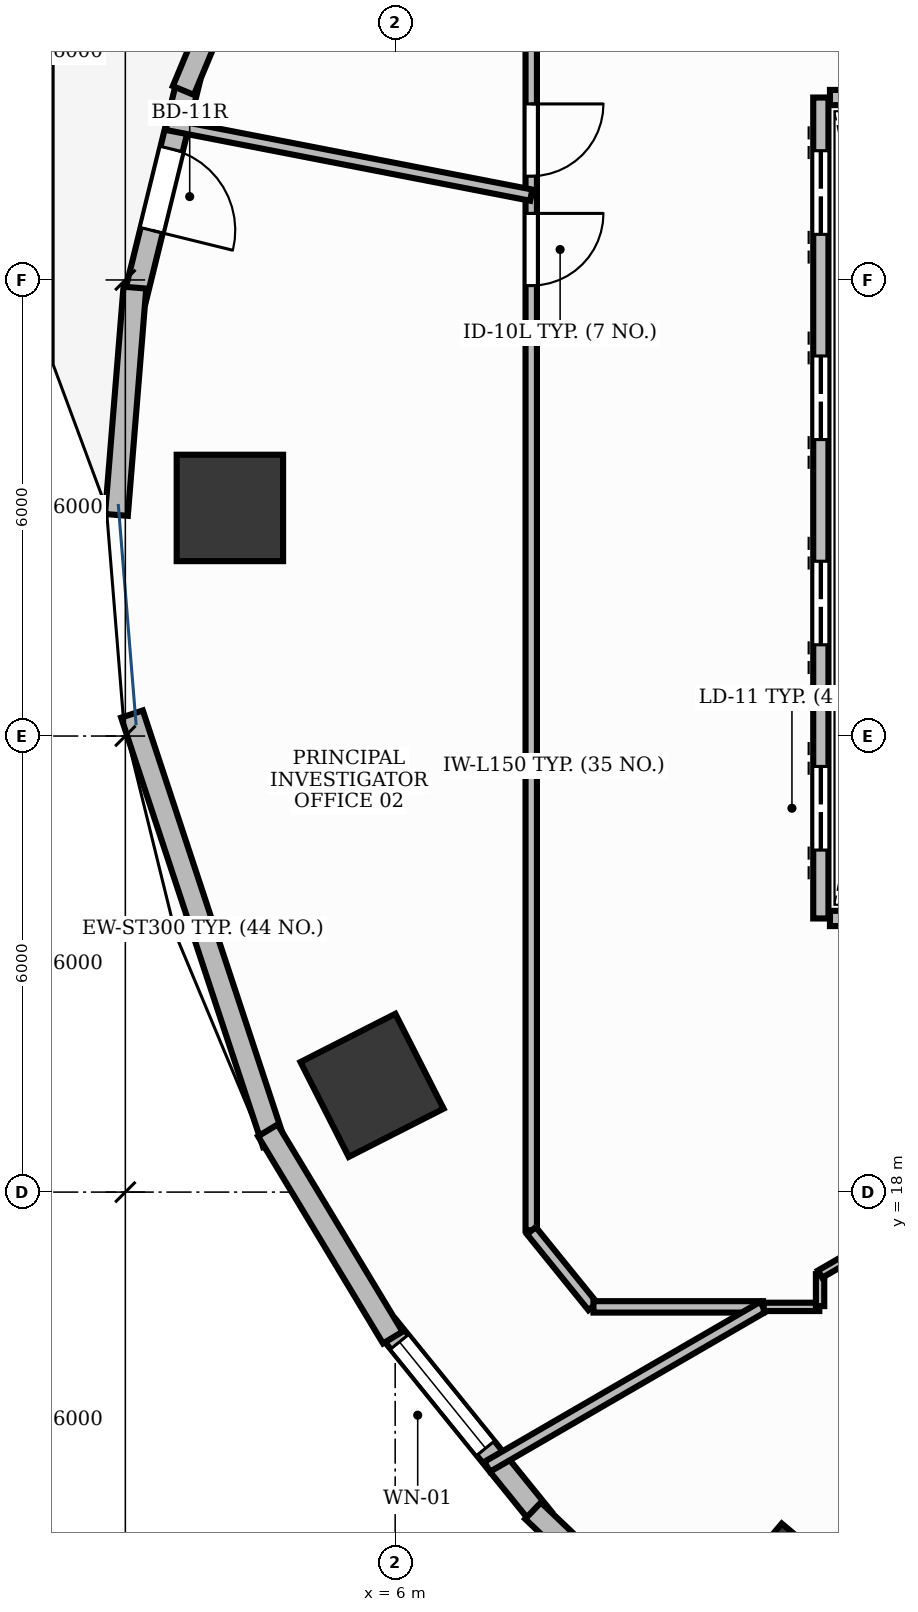
"""IFC4 building model, lengths in metres.
Left out: names, types, materials, properties, quantities, classifications, styles, units other than length and angle.
Written with IfcOpenShell. Run it as: python <this file> out.ifc"""

import sys

from ifc_helpers import new_model, si_unit, direction, frame, frame_2d, origin, origin_2d, place, context, subcontext, project, spatial, rectangle, extrude, element, fill, save


model = new_model("IFC4")
c1 = context("Model", 3, precision=1e-05, world=origin(), true_north=direction((0.0, 1.0)))
c2 = subcontext(c1, "Body", "Model", "MODEL_VIEW")
j1 = project(units=[si_unit("LENGTHUNIT", "METRE"), si_unit("PLANEANGLEUNIT", "RADIAN")], contexts=[c1])
p1 = place(None, origin())
s1 = spatial("IfcSite", under=j1, at=p1, CompositionType="ELEMENT")
p2 = place(p1, origin())
s2 = spatial("IfcBuilding", under=s1, at=p2, CompositionType="ELEMENT")
p3 = place(p2, frame((0.0, 0.0, 76.2)))
s3 = spatial("IfcBuildingStorey", under=s2, at=p3, CompositionType="ELEMENT", Elevation=76.2)
for number, where, z_axis, x_axis in (
    (1, (3.825, 27.001, -0.0), (0.0, 0.0, 1.0), (0.0, 1.0, 0.0)),
    (2, (5.696, 19.404, -0.0), (0.0, 0.0, 1.0), (-0.453, 0.891, 0.0)),
    (3, (11.17, 12.653, -0.0), (0.0, 0.0, 1.0), (-0.764, 0.645, 0.0)),
):
    element("IfcColumn", number, at=place(p3, frame(where, z_axis=z_axis, x_axis=x_axis)), inside=s3, PredefinedType="COLUMN", context=c2, shape_type="SweptSolid", body=[
        extrude(rectangle(XDim=1.4, YDim=1.4, at=origin_2d()), origin(), (0.0, 0.0, 1.0), 3.901),
    ])
p4 = place(p3, frame((3.285, 32.641, 0.0), z_axis=(0.0, 0.0, 1.0), x_axis=(-0.238522035896, -0.971137085273, 0.0)))
e4 = element("IfcWall", 4, at=p4, inside=s3, PredefinedType="STANDARD", context=c2, shape_type="SweptSolid", body=[
    extrude(rectangle(XDim=2.993, YDim=0.3, at=frame_2d((1.497, 0.0))), origin(), (0.0, 0.0, 1.0), 3.9),
])
p5 = place(p4, frame((0.946, 0.0, 0.0)))
e5 = element("IfcOpeningElement", 5, at=p5, cuts=e4, PredefinedType="OPENING", context=c2, shape_type="SweptSolid", body=[
    extrude(rectangle(XDim=1.1, YDim=2.15, at=frame_2d((0.55, 1.075))), frame((0.0, 0.165, 0.0), z_axis=(0.0, -1.0, 0.0), x_axis=(1.0, 0.0, 0.0)), (0.0, 0.0, 1.0), 0.33),
])
p6 = place(p3, frame((5.894, 16.23, 0.0), z_axis=(0.0, 0.0, 1.0), x_axis=(0.629295540187, -0.777166084631, 0.0)))
e6 = element("IfcWall", 6, at=p6, inside=s3, PredefinedType="STANDARD", context=c2, shape_type="SweptSolid", body=[
    extrude(rectangle(XDim=3.248, YDim=0.3, at=frame_2d((1.624, 0.0))), origin(), (0.0, 0.0, 1.0), 3.47),
])
p7 = place(p6, frame((0.258, 0.0, 0.9)))
e7 = element("IfcOpeningElement", 7, at=p7, cuts=e6, PredefinedType="OPENING", context=c2, shape_type="SweptSolid", body=[
    extrude(rectangle(XDim=1.8, YDim=2.1, at=frame_2d((0.9, 1.05))), frame((0.0, 0.165, 0.0), z_axis=(0.0, -1.0, 0.0), x_axis=(1.0, 0.0, 0.0)), (0.0, 0.0, 1.0), 0.33),
])
p8 = place(p3, frame((4.406, 35.349, 0.0), z_axis=(0.0, 0.0, 1.0), x_axis=(-0.38535448421, -0.922768617531, 0.0)))
e8 = element("IfcWall", 8, at=p8, inside=s3, PredefinedType="STANDARD", context=c2, shape_type="SweptSolid", body=[
    extrude(rectangle(XDim=3.095, YDim=0.3, at=frame_2d((1.548, 0.0))), origin(), (0.0, 0.0, 1.0), 3.9),
])
p9 = place(p3, frame((2.576, 29.899, 0.0), z_axis=(0.0, 0.0, 1.0), x_axis=(-0.080890160317, -0.996723021689, 0.0)))
e9 = element("IfcWall", 9, at=p9, inside=s3, PredefinedType="STANDARD", context=c2, shape_type="SweptSolid", body=[
    extrude(rectangle(XDim=3.0, YDim=0.3, at=frame_2d((1.5, 0.0))), origin(), (0.0, 0.0, 1.0), 3.9),
])
p10 = place(p3, frame((2.537, 24.289, 0.0), z_axis=(0.0, 0.0, 1.0), x_axis=(0.31372816724, -0.949512841978, 0.0)))
e10 = element("IfcWall", 10, at=p10, inside=s3, PredefinedType="STANDARD", context=c2, shape_type="SweptSolid", body=[
    extrude(rectangle(XDim=5.951, YDim=0.3, at=frame_2d((2.976, 0.0))), origin(), (0.0, 0.0, 1.0), 3.9),
])
p11 = place(p3, frame((4.325, 18.812, 0.0), z_axis=(0.0, 0.0, 1.0), x_axis=(0.516423528484, -0.856333310825, 0.0)))
e11 = element("IfcWall", 11, at=p11, inside=s3, PredefinedType="STANDARD", context=c2, shape_type="SweptSolid", body=[
    extrude(rectangle(XDim=3.183, YDim=0.3, at=frame_2d((1.591, 0.0))), origin(), (0.0, 0.0, 1.0), 3.47),
])
p12 = place(p3, frame((7.814, 13.808, 0.0), z_axis=(0.0, 0.0, 1.0), x_axis=(0.72369587847, -0.69011902994, 0.0)))
e12 = element("IfcWall", 12, at=p12, inside=s3, PredefinedType="STANDARD", context=c2, shape_type="SweptSolid", body=[
    extrude(rectangle(XDim=3.403, YDim=0.3, at=frame_2d((1.701, 0.0))), origin(), (0.0, 0.0, 1.0), 3.47),
])
p13 = place(p3, frame((11.6, 21.6, 0.0), z_axis=(0.0, 0.0, 1.0), x_axis=(0.0, 1.0, 0.0)))
e13 = element("IfcWall", 13, at=p13, inside=s3, PredefinedType="PARTITIONING", context=c2, shape_type="SweptSolid", body=[
    extrude(rectangle(XDim=10.8, YDim=0.2, at=frame_2d((5.4, 0.0))), origin(), (0.0, 0.0, 1.0), 2.91),
])
p14 = place(p13, frame((0.9, 0.0, 0.0)))
e14 = element("IfcOpeningElement", 14, at=p14, cuts=e13, PredefinedType="OPENING", context=c2, shape_type="SweptSolid", body=[
    extrude(rectangle(XDim=1.1, YDim=2.2, at=frame_2d((0.55, 1.1))), frame((0.0, 0.115, 0.0), z_axis=(0.0, -1.0, 0.0), x_axis=(1.0, 0.0, 0.0)), (0.0, 0.0, 1.0), 0.23),
])
p15 = place(p13, frame((3.6, 0.0, 0.0)))
e15 = element("IfcOpeningElement", 15, at=p15, cuts=e13, PredefinedType="OPENING", context=c2, shape_type="SweptSolid", body=[
    extrude(rectangle(XDim=1.1, YDim=2.2, at=frame_2d((0.55, 1.1))), frame((0.0, 0.115, 0.0), z_axis=(0.0, -1.0, 0.0), x_axis=(1.0, 0.0, 0.0)), (0.0, 0.0, 1.0), 0.23),
])
p16 = place(p13, frame((6.3, 0.0, 0.0)))
e16 = element("IfcOpeningElement", 16, at=p16, cuts=e13, PredefinedType="OPENING", context=c2, shape_type="SweptSolid", body=[
    extrude(rectangle(XDim=1.1, YDim=2.2, at=frame_2d((0.55, 1.1))), frame((0.0, 0.115, 0.0), z_axis=(0.0, -1.0, 0.0), x_axis=(1.0, 0.0, 0.0)), (0.0, 0.0, 1.0), 0.23),
])
p17 = place(p13, frame((9.0, 0.0, 0.0)))
e17 = element("IfcOpeningElement", 17, at=p17, cuts=e13, PredefinedType="OPENING", context=c2, shape_type="SweptSolid", body=[
    extrude(rectangle(XDim=1.1, YDim=2.2, at=frame_2d((0.55, 1.1))), frame((0.0, 0.115, 0.0), z_axis=(0.0, -1.0, 0.0), x_axis=(1.0, 0.0, 0.0)), (0.0, 0.0, 1.0), 0.23),
])
for number, where, z_axis, x_axis in (
    (18, (11.72, 21.6, 0.0), (0.0, 0.0, 1.0), (1.0, 0.0, 0.0)),
    (19, (11.72, 32.4, 0.0), (0.0, 0.0, 1.0), (1.0, 0.0, 0.0)),
):
    element("IfcWall", number, at=place(p3, frame(where, z_axis=z_axis, x_axis=x_axis)), inside=s3, PredefinedType="PARTITIONING", context=c2, shape_type="SweptSolid", body=[
        extrude(rectangle(XDim=2.16, YDim=0.2, at=frame_2d((1.08, 0.0))), origin(), (0.0, 0.0, 1.0), 2.91),
    ])
p18 = place(p3, frame((7.79, 31.115, 0.0), z_axis=(0.0, 0.0, 1.0), x_axis=(0.0, -1.0, 0.0)))
e20 = element("IfcWall", 20, at=p18, inside=s3, PredefinedType="PARTITIONING", context=c2, shape_type="SweptSolid", body=[
    extrude(rectangle(XDim=13.617, YDim=0.15, at=frame_2d((6.808, 0.0))), origin(), (0.0, 0.0, 1.0), 2.91),
])
p19 = place(p18, frame((0.24, 0.0, 0.0)))
e21 = element("IfcOpeningElement", 21, at=p19, cuts=e20, PredefinedType="OPENING", context=c2, shape_type="SweptSolid", body=[
    extrude(rectangle(XDim=0.95, YDim=2.15, at=frame_2d((0.475, 1.075))), frame((0.0, 0.09, 0.0), z_axis=(0.0, -1.0, 0.0), x_axis=(1.0, 0.0, 0.0)), (0.0, 0.0, 1.0), 0.18),
])
p20 = place(p3, frame((7.79, 36.501, 0.0), z_axis=(0.0, 0.0, 1.0), x_axis=(0.0, -1.0, 0.0)))
e22 = element("IfcWall", 22, at=p20, inside=s3, PredefinedType="PARTITIONING", context=c2, shape_type="SweptSolid", body=[
    extrude(rectangle(XDim=5.375, YDim=0.15, at=frame_2d((2.688, 0.0))), origin(), (0.0, 0.0, 1.0), 2.91),
])
p21 = place(p20, frame((4.185, 0.0, 0.0)))
e23 = element("IfcOpeningElement", 23, at=p21, cuts=e22, PredefinedType="OPENING", context=c2, shape_type="SweptSolid", body=[
    extrude(rectangle(XDim=0.95, YDim=2.15, at=frame_2d((0.475, 1.075))), frame((0.0, 0.09, 0.0), z_axis=(0.0, -1.0, 0.0), x_axis=(1.0, 0.0, 0.0)), (0.0, 0.0, 1.0), 0.18),
])
p22 = place(p3, frame((2.995, 32.048, 0.0), z_axis=(0.0, 0.0, 1.0), x_axis=(0.981623712682, -0.190826850052, 0.0)))
e24 = element("IfcWall", 24, at=p22, inside=s3, PredefinedType="PARTITIONING", context=c2, shape_type="SweptSolid", body=[
    extrude(rectangle(XDim=4.885, YDim=0.15, at=frame_2d((2.442, 0.0))), origin(), (0.0, 0.0, 1.0), 2.91),
])
p23 = place(p3, frame((7.792, 17.492, 0.0), z_axis=(0.0, 0.0, 1.0), x_axis=(0.629225554682, -0.777222748854, 0.0)))
e25 = element("IfcWall", 25, at=p23, inside=s3, PredefinedType="PARTITIONING", context=c2, shape_type="SweptSolid", body=[
    extrude(rectangle(XDim=1.285, YDim=0.15, at=frame_2d((0.643, 0.0))), origin(), (0.0, 0.0, 1.0), 2.91),
])
p24 = place(p3, frame((8.609, 16.49, 0.0), z_axis=(0.0, 0.0, 1.0), x_axis=(1.0, 0.0, 0.0)))
e26 = element("IfcWall", 26, at=p24, inside=s3, PredefinedType="PARTITIONING", context=c2, shape_type="SweptSolid", body=[
    extrude(rectangle(XDim=2.23, YDim=0.15, at=frame_2d((1.115, 0.0))), origin(), (0.0, 0.0, 1.0), 2.91),
])
p25 = place(p3, frame((10.839, 16.49, 0.0), z_axis=(0.0, 0.0, 1.0), x_axis=(-0.865171113314, -0.501476763856, 0.0)))
e27 = element("IfcWall", 27, at=p25, inside=s3, PredefinedType="PARTITIONING", context=c2, shape_type="SweptSolid", body=[
    extrude(rectangle(XDim=4.194, YDim=0.15, at=frame_2d((2.097, 0.0))), origin(), (0.0, 0.0, 1.0), 2.91),
])
p26 = place(p3, frame((10.849, 16.49, 0.0), z_axis=(0.0, 0.0, 1.0), x_axis=(1.0, 0.0, 0.0)))
e28 = element("IfcWall", 28, at=p26, inside=s3, PredefinedType="MOVABLE", context=c2, shape_type="SweptSolid", body=[
    extrude(rectangle(XDim=0.731, YDim=0.11, at=frame_2d((0.366, 0.0))), origin(), (0.0, 0.0, 1.0), 2.91),
])
p27 = place(p3, frame((11.59, 16.5, 0.0), z_axis=(0.0, 0.0, 1.0), x_axis=(0.0, 1.0, 0.0)))
e29 = element("IfcWall", 29, at=p27, inside=s3, PredefinedType="MOVABLE", context=c2, shape_type="SweptSolid", body=[
    extrude(rectangle(XDim=0.421, YDim=0.11, at=frame_2d((0.21, 0.0))), origin(), (0.0, 0.0, 1.0), 2.91),
])
p28 = place(p3, frame((11.59, 16.921, 0.0), z_axis=(0.0, 0.0, 1.0), x_axis=(0.865161287927, 0.50149371469, 0.0)))
e30 = element("IfcWall", 30, at=p28, inside=s3, PredefinedType="MOVABLE", context=c2, shape_type="SweptSolid", body=[
    extrude(rectangle(XDim=3.029, YDim=0.11, at=frame_2d((1.515, 0.0))), origin(), (0.0, 0.0, 1.0), 2.91),
])
p29 = place(p5, origin())
e31 = element("IfcDoor", 31, at=p29, inside=s3, OperationType="SINGLE_SWING_RIGHT", PredefinedType="DOOR", context=c2, shape_type="SweptSolid", body=[
    extrude(rectangle(XDim=1.1, YDim=2.15, at=frame_2d((0.55, 1.075))), frame((0.0, 0.025, 0.0), z_axis=(0.0, -1.0, 0.0), x_axis=(1.0, 0.0, 0.0)), (0.0, 0.0, 1.0), 0.05),
])
fill(e5, e31)
p30 = place(p7, origin())
e32 = element("IfcWindow", 32, at=p30, inside=s3, PartitioningType="SINGLE_PANEL", PredefinedType="WINDOW", context=c2, shape_type="SweptSolid", body=[
    extrude(rectangle(XDim=1.8, YDim=2.1, at=frame_2d((0.9, 1.05))), frame((0.0, 0.03, 0.0), z_axis=(0.0, -1.0, 0.0), x_axis=(1.0, 0.0, 0.0)), (0.0, 0.0, 1.0), 0.06),
])
fill(e7, e32)
p31 = place(p14, origin())
e33 = element("IfcDoor", 33, at=p31, inside=s3, OperationType="DOUBLE_DOOR_SLIDING", PredefinedType="DOOR", context=c2, shape_type="SweptSolid", body=[
    extrude(rectangle(XDim=1.1, YDim=2.2, at=frame_2d((0.55, 1.1))), frame((0.0, 0.025, 0.0), z_axis=(0.0, -1.0, 0.0), x_axis=(1.0, 0.0, 0.0)), (0.0, 0.0, 1.0), 0.05),
])
fill(e14, e33)
p32 = place(p15, origin())
e34 = element("IfcDoor", 34, at=p32, inside=s3, OperationType="DOUBLE_DOOR_SLIDING", PredefinedType="DOOR", context=c2, shape_type="SweptSolid", body=[
    extrude(rectangle(XDim=1.1, YDim=2.2, at=frame_2d((0.55, 1.1))), frame((0.0, 0.025, 0.0), z_axis=(0.0, -1.0, 0.0), x_axis=(1.0, 0.0, 0.0)), (0.0, 0.0, 1.0), 0.05),
])
fill(e15, e34)
p33 = place(p16, origin())
e35 = element("IfcDoor", 35, at=p33, inside=s3, OperationType="DOUBLE_DOOR_SLIDING", PredefinedType="DOOR", context=c2, shape_type="SweptSolid", body=[
    extrude(rectangle(XDim=1.1, YDim=2.2, at=frame_2d((0.55, 1.1))), frame((0.0, 0.025, 0.0), z_axis=(0.0, -1.0, 0.0), x_axis=(1.0, 0.0, 0.0)), (0.0, 0.0, 1.0), 0.05),
])
fill(e16, e35)
p34 = place(p17, origin())
e36 = element("IfcDoor", 36, at=p34, inside=s3, OperationType="DOUBLE_DOOR_SLIDING", PredefinedType="DOOR", context=c2, shape_type="SweptSolid", body=[
    extrude(rectangle(XDim=1.1, YDim=2.2, at=frame_2d((0.55, 1.1))), frame((0.0, 0.025, 0.0), z_axis=(0.0, -1.0, 0.0), x_axis=(1.0, 0.0, 0.0)), (0.0, 0.0, 1.0), 0.05),
])
fill(e17, e36)
p35 = place(p19, origin())
e37 = element("IfcDoor", 37, at=p35, inside=s3, OperationType="SINGLE_SWING_LEFT", PredefinedType="DOOR", context=c2, shape_type="SweptSolid", body=[
    extrude(rectangle(XDim=0.95, YDim=2.15, at=frame_2d((0.475, 1.075))), frame((0.0, 0.025, 0.0), z_axis=(0.0, -1.0, 0.0), x_axis=(1.0, 0.0, 0.0)), (0.0, 0.0, 1.0), 0.05),
])
fill(e21, e37)
p36 = place(p21, origin())
e38 = element("IfcDoor", 38, at=p36, inside=s3, OperationType="SINGLE_SWING_LEFT", PredefinedType="DOOR", context=c2, shape_type="SweptSolid", body=[
    extrude(rectangle(XDim=0.95, YDim=2.15, at=frame_2d((0.475, 1.075))), frame((0.0, 0.025, 0.0), z_axis=(0.0, -1.0, 0.0), x_axis=(1.0, 0.0, 0.0)), (0.0, 0.0, 1.0), 0.05),
])
fill(e23, e38)
save(model, sys.argv[1])
